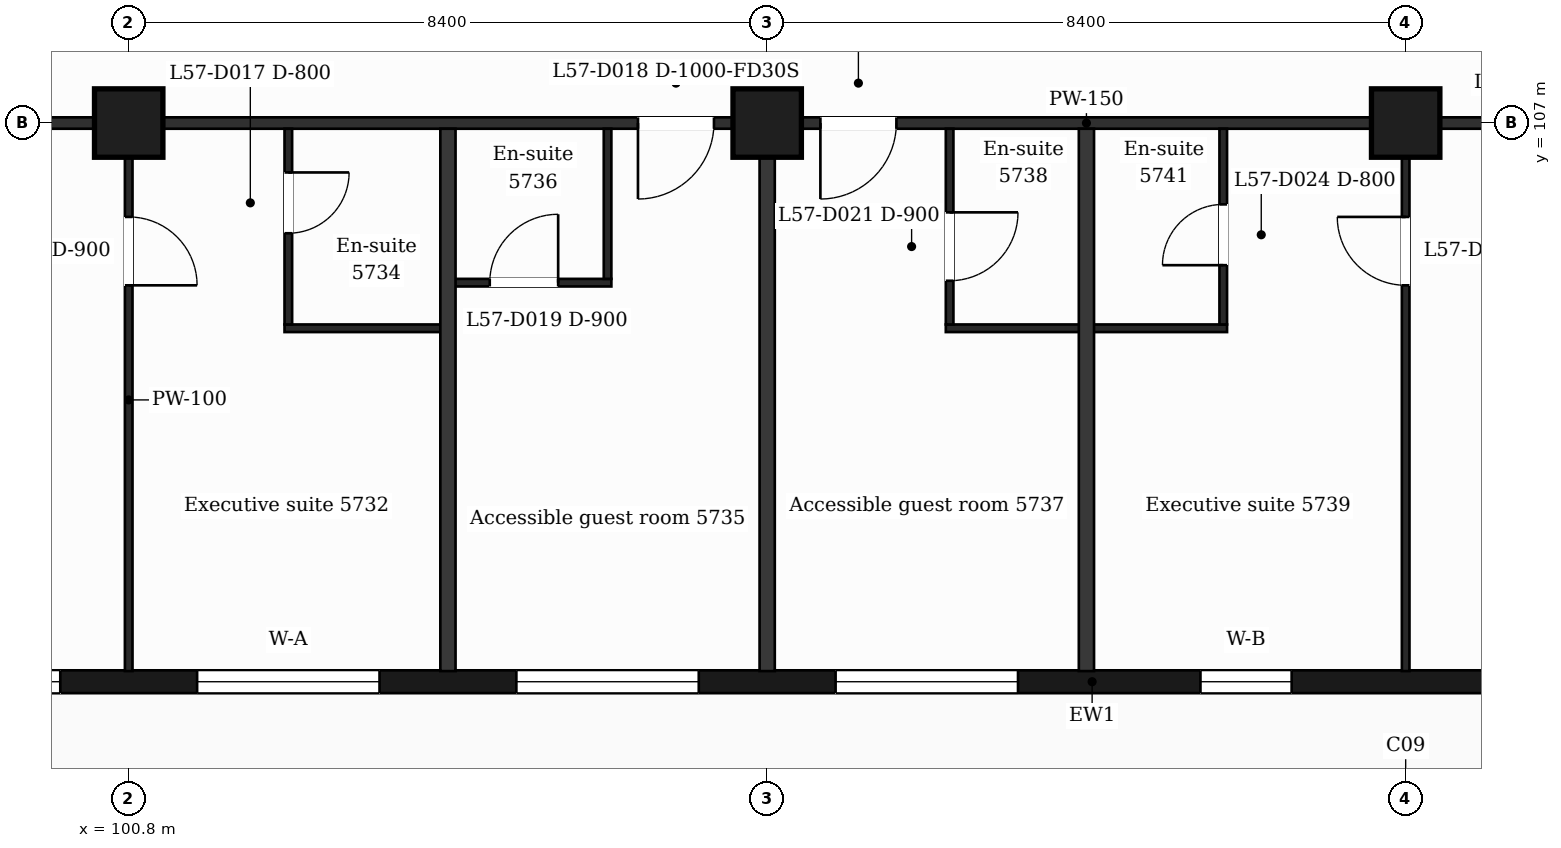
"""IFC4 building model, lengths in metres.
Left out: names, types, materials, properties, quantities, classifications, styles, units other than length and angle.
Written with IfcOpenShell. Run it as: python <this file> out.ifc"""

import sys

from ifc_helpers import new_model, si_unit, direction, frame, frame_2d, origin, origin_2d, place, context, subcontext, project, spatial, rectangle, extrude, element, fill, save


model = new_model("IFC4")
c1 = context("Model", 3, precision=1e-05, world=origin(), true_north=direction((0.0, 1.0)))
c2 = subcontext(c1, "Body", "Model", "MODEL_VIEW")
j1 = project(units=[si_unit("LENGTHUNIT", "METRE"), si_unit("PLANEANGLEUNIT", "RADIAN")], contexts=[c1])
p1 = place(None, origin())
s1 = spatial("IfcSite", under=j1, at=p1, CompositionType="ELEMENT")
p2 = place(p1, origin())
s2 = spatial("IfcBuilding", under=s1, at=p2, CompositionType="ELEMENT")
p3 = place(p2, frame((0.0, 0.0, 235.5)))
s3 = spatial("IfcBuildingStorey", under=s2, at=p3, CompositionType="ELEMENT", Elevation=235.5)
for number, where, z_axis, x_axis in (
    (1, (100.8, 107.0, 0.0), (0.0, 0.0, 1.0), (1.0, 0.0, 0.0)),
    (2, (109.2, 107.0, 0.0), (0.0, 0.0, 1.0), (1.0, 0.0, 0.0)),
    (3, (117.6, 107.0, 0.0), (0.0, 0.0, 1.0), (1.0, 0.0, 0.0)),
):
    element("IfcColumn", number, at=place(p3, frame(where, z_axis=z_axis, x_axis=x_axis)), inside=s3, PredefinedType="COLUMN", context=c2, shape_type="SweptSolid", body=[
        extrude(rectangle(XDim=0.9, YDim=0.9, at=origin_2d()), origin(), (0.0, 0.0, 1.0), 3.7),
    ])
p4 = place(p3, frame((89.85, 99.65, 0.0), z_axis=(0.0, 0.0, 1.0), x_axis=(1.0, 0.0, 0.0)))
e4 = element("IfcWall", 4, at=p4, inside=s3, PredefinedType="SOLIDWALL", context=c2, shape_type="SweptSolid", body=[
    extrude(rectangle(XDim=47.25, YDim=0.3, at=frame_2d((23.625, 0.0))), origin(), (0.0, 0.0, 1.0), 3.38),
])
p5 = place(p4, frame((0.725, 0.0, 0.9)))
e5 = element("IfcOpeningElement", 5, at=p5, cuts=e4, PredefinedType="OPENING", context=c2, shape_type="SweptSolid", body=[
    extrude(rectangle(XDim=1.2, YDim=2.1, at=frame_2d((0.6, 1.05))), frame((0.0, 0.16, 0.0), z_axis=(0.0, -1.0, 0.0), x_axis=(1.0, 0.0, 0.0)), (0.0, 0.0, 1.0), 0.32),
])
p6 = place(p4, frame((3.45, 0.0, 0.9)))
e6 = element("IfcOpeningElement", 6, at=p6, cuts=e4, PredefinedType="OPENING", context=c2, shape_type="SweptSolid", body=[
    extrude(rectangle(XDim=2.4, YDim=2.1, at=frame_2d((1.2, 1.05))), frame((0.0, 0.16, 0.0), z_axis=(0.0, -1.0, 0.0), x_axis=(1.0, 0.0, 0.0)), (0.0, 0.0, 1.0), 0.32),
])
p7 = place(p4, frame((7.65, 0.0, 0.9)))
e7 = element("IfcOpeningElement", 7, at=p7, cuts=e4, PredefinedType="OPENING", context=c2, shape_type="SweptSolid", body=[
    extrude(rectangle(XDim=2.4, YDim=2.1, at=frame_2d((1.2, 1.05))), frame((0.0, 0.16, 0.0), z_axis=(0.0, -1.0, 0.0), x_axis=(1.0, 0.0, 0.0)), (0.0, 0.0, 1.0), 0.32),
])
p8 = place(p4, frame((11.85, 0.0, 0.9)))
e8 = element("IfcOpeningElement", 8, at=p8, cuts=e4, PredefinedType="OPENING", context=c2, shape_type="SweptSolid", body=[
    extrude(rectangle(XDim=2.4, YDim=2.1, at=frame_2d((1.2, 1.05))), frame((0.0, 0.16, 0.0), z_axis=(0.0, -1.0, 0.0), x_axis=(1.0, 0.0, 0.0)), (0.0, 0.0, 1.0), 0.32),
])
p9 = place(p4, frame((16.05, 0.0, 0.9)))
e9 = element("IfcOpeningElement", 9, at=p9, cuts=e4, PredefinedType="OPENING", context=c2, shape_type="SweptSolid", body=[
    extrude(rectangle(XDim=2.4, YDim=2.1, at=frame_2d((1.2, 1.05))), frame((0.0, 0.16, 0.0), z_axis=(0.0, -1.0, 0.0), x_axis=(1.0, 0.0, 0.0)), (0.0, 0.0, 1.0), 0.32),
])
p10 = place(p4, frame((20.25, 0.0, 0.9)))
e10 = element("IfcOpeningElement", 10, at=p10, cuts=e4, PredefinedType="OPENING", context=c2, shape_type="SweptSolid", body=[
    extrude(rectangle(XDim=2.4, YDim=2.1, at=frame_2d((1.2, 1.05))), frame((0.0, 0.16, 0.0), z_axis=(0.0, -1.0, 0.0), x_axis=(1.0, 0.0, 0.0)), (0.0, 0.0, 1.0), 0.32),
])
p11 = place(p4, frame((25.05, 0.0, 0.9)))
e11 = element("IfcOpeningElement", 11, at=p11, cuts=e4, PredefinedType="OPENING", context=c2, shape_type="SweptSolid", body=[
    extrude(rectangle(XDim=1.2, YDim=2.1, at=frame_2d((0.6, 1.05))), frame((0.0, 0.16, 0.0), z_axis=(0.0, -1.0, 0.0), x_axis=(1.0, 0.0, 0.0)), (0.0, 0.0, 1.0), 0.32),
])
p12 = place(p4, frame((29.25, 0.0, 0.9)))
e12 = element("IfcOpeningElement", 12, at=p12, cuts=e4, PredefinedType="OPENING", context=c2, shape_type="SweptSolid", body=[
    extrude(rectangle(XDim=1.2, YDim=2.1, at=frame_2d((0.6, 1.05))), frame((0.0, 0.16, 0.0), z_axis=(0.0, -1.0, 0.0), x_axis=(1.0, 0.0, 0.0)), (0.0, 0.0, 1.0), 0.32),
])
p13 = place(p4, frame((32.55, 0.0, 0.0)))
e13 = element("IfcOpeningElement", 13, at=p13, cuts=e4, PredefinedType="OPENING", context=c2, shape_type="SweptSolid", body=[
    extrude(rectangle(XDim=1.2, YDim=2.4, at=frame_2d((0.6, 1.2))), frame((0.0, 0.16, 0.0), z_axis=(0.0, -1.0, 0.0), x_axis=(1.0, 0.0, 0.0)), (0.0, 0.0, 1.0), 0.32),
])
p14 = place(p4, frame((34.35, 0.0, 0.9)))
e14 = element("IfcOpeningElement", 14, at=p14, cuts=e4, PredefinedType="OPENING", context=c2, shape_type="SweptSolid", body=[
    extrude(rectangle(XDim=1.2, YDim=2.1, at=frame_2d((0.6, 1.05))), frame((0.0, 0.16, 0.0), z_axis=(0.0, -1.0, 0.0), x_axis=(1.0, 0.0, 0.0)), (0.0, 0.0, 1.0), 0.32),
])
p15 = place(p4, frame((37.05, 0.0, 0.9)))
e15 = element("IfcOpeningElement", 15, at=p15, cuts=e4, PredefinedType="OPENING", context=c2, shape_type="SweptSolid", body=[
    extrude(rectangle(XDim=2.4, YDim=2.1, at=frame_2d((1.2, 1.05))), frame((0.0, 0.16, 0.0), z_axis=(0.0, -1.0, 0.0), x_axis=(1.0, 0.0, 0.0)), (0.0, 0.0, 1.0), 0.32),
])
p16 = place(p4, frame((40.95, 0.0, 0.0)))
e16 = element("IfcOpeningElement", 16, at=p16, cuts=e4, PredefinedType="OPENING", context=c2, shape_type="SweptSolid", body=[
    extrude(rectangle(XDim=1.2, YDim=2.4, at=frame_2d((0.6, 1.2))), frame((0.0, 0.16, 0.0), z_axis=(0.0, -1.0, 0.0), x_axis=(1.0, 0.0, 0.0)), (0.0, 0.0, 1.0), 0.32),
])
p17 = place(p4, frame((42.75, 0.0, 0.9)))
e17 = element("IfcOpeningElement", 17, at=p17, cuts=e4, PredefinedType="OPENING", context=c2, shape_type="SweptSolid", body=[
    extrude(rectangle(XDim=1.2, YDim=2.1, at=frame_2d((0.6, 1.05))), frame((0.0, 0.16, 0.0), z_axis=(0.0, -1.0, 0.0), x_axis=(1.0, 0.0, 0.0)), (0.0, 0.0, 1.0), 0.32),
])
p18 = place(p4, frame((45.25, 0.0, 0.9)))
e18 = element("IfcOpeningElement", 18, at=p18, cuts=e4, PredefinedType="OPENING", context=c2, shape_type="SweptSolid", body=[
    extrude(rectangle(XDim=1.2, YDim=2.1, at=frame_2d((0.6, 1.05))), frame((0.0, 0.16, 0.0), z_axis=(0.0, -1.0, 0.0), x_axis=(1.0, 0.0, 0.0)), (0.0, 0.0, 1.0), 0.32),
])
p19 = place(p3, frame((102.85, 104.3, 0.0), z_axis=(0.0, 0.0, 1.0), x_axis=(1.0, 0.0, 0.0)))
e19 = element("IfcWall", 19, at=p19, inside=s3, PredefinedType="PARTITIONING", context=c2, shape_type="SweptSolid", body=[
    extrude(rectangle(XDim=2.15, YDim=0.1, at=frame_2d((1.075, 0.0))), origin(), (0.0, 0.0, 1.0), 3.38),
])
p20 = place(p3, frame((111.55, 104.3, 0.0), z_axis=(0.0, 0.0, 1.0), x_axis=(1.0, 0.0, 0.0)))
e20 = element("IfcWall", 20, at=p20, inside=s3, PredefinedType="PARTITIONING", context=c2, shape_type="SweptSolid", body=[
    extrude(rectangle(XDim=3.7, YDim=0.1, at=frame_2d((1.85, 0.0))), origin(), (0.0, 0.0, 1.0), 3.38),
])
p21 = place(p3, frame((105.0, 104.9, 0.0), z_axis=(0.0, 0.0, 1.0), x_axis=(1.0, 0.0, 0.0)))
e21 = element("IfcWall", 21, at=p21, inside=s3, PredefinedType="PARTITIONING", context=c2, shape_type="SweptSolid", body=[
    extrude(rectangle(XDim=2.15, YDim=0.1, at=frame_2d((1.075, 0.0))), origin(), (0.0, 0.0, 1.0), 3.38),
])
p22 = place(p21, frame((0.55, 0.0, 0.0)))
e22 = element("IfcOpeningElement", 22, at=p22, cuts=e21, PredefinedType="OPENING", context=c2, shape_type="SweptSolid", body=[
    extrude(rectangle(XDim=0.9, YDim=2.1, at=frame_2d((0.45, 1.05))), frame((0.0, 0.06, 0.0), z_axis=(0.0, -1.0, 0.0), x_axis=(1.0, 0.0, 0.0)), (0.0, 0.0, 1.0), 0.12),
])
p23 = place(p3, frame((87.018, 107.0, 0.0), z_axis=(0.0, 0.0, 1.0), x_axis=(1.0, 0.0, 0.0)))
e23 = element("IfcWall", 23, at=p23, inside=s3, PredefinedType="PARTITIONING", context=c2, shape_type="SweptSolid", body=[
    extrude(rectangle(XDim=52.765, YDim=0.15, at=frame_2d((26.382, 0.0))), origin(), (0.0, 0.0, 1.0), 3.38),
])
p24 = place(p23, frame((0.707, 0.0, 0.0)))
e24 = element("IfcOpeningElement", 24, at=p24, cuts=e23, PredefinedType="OPENING", context=c2, shape_type="SweptSolid", body=[
    extrude(rectangle(XDim=0.95, YDim=2.1, at=frame_2d((0.475, 1.05))), frame((0.0, 0.085, 0.0), z_axis=(0.0, -1.0, 0.0), x_axis=(1.0, 0.0, 0.0)), (0.0, 0.0, 1.0), 0.17),
])
p25 = place(p23, frame((8.412, 0.0, 0.0)))
e25 = element("IfcOpeningElement", 25, at=p25, cuts=e23, PredefinedType="OPENING", context=c2, shape_type="SweptSolid", body=[
    extrude(rectangle(XDim=1.0, YDim=2.1, at=frame_2d((0.5, 1.05))), frame((0.0, 0.085, 0.0), z_axis=(0.0, -1.0, 0.0), x_axis=(1.0, 0.0, 0.0)), (0.0, 0.0, 1.0), 0.17),
])
p26 = place(p23, frame((20.482, 0.0, 0.0)))
e26 = element("IfcOpeningElement", 26, at=p26, cuts=e23, PredefinedType="OPENING", context=c2, shape_type="SweptSolid", body=[
    extrude(rectangle(XDim=1.0, YDim=2.1, at=frame_2d((0.5, 1.05))), frame((0.0, 0.085, 0.0), z_axis=(0.0, -1.0, 0.0), x_axis=(1.0, 0.0, 0.0)), (0.0, 0.0, 1.0), 0.17),
])
p27 = place(p23, frame((22.882, 0.0, 0.0)))
e27 = element("IfcOpeningElement", 27, at=p27, cuts=e23, PredefinedType="OPENING", context=c2, shape_type="SweptSolid", body=[
    extrude(rectangle(XDim=1.0, YDim=2.1, at=frame_2d((0.5, 1.05))), frame((0.0, 0.085, 0.0), z_axis=(0.0, -1.0, 0.0), x_axis=(1.0, 0.0, 0.0)), (0.0, 0.0, 1.0), 0.17),
])
p28 = place(p23, frame((32.607, 0.0, 0.0)))
e28 = element("IfcOpeningElement", 28, at=p28, cuts=e23, PredefinedType="OPENING", context=c2, shape_type="SweptSolid", body=[
    extrude(rectangle(XDim=1.0, YDim=2.1, at=frame_2d((0.5, 1.05))), frame((0.0, 0.085, 0.0), z_axis=(0.0, -1.0, 0.0), x_axis=(1.0, 0.0, 0.0)), (0.0, 0.0, 1.0), 0.17),
])
p29 = place(p23, frame((39.707, 0.0, 0.0)))
e29 = element("IfcOpeningElement", 29, at=p29, cuts=e23, PredefinedType="OPENING", context=c2, shape_type="SweptSolid", body=[
    extrude(rectangle(XDim=0.95, YDim=2.1, at=frame_2d((0.475, 1.05))), frame((0.0, 0.085, 0.0), z_axis=(0.0, -1.0, 0.0), x_axis=(1.0, 0.0, 0.0)), (0.0, 0.0, 1.0), 0.17),
])
p30 = place(p23, frame((43.457, 0.0, 0.0)))
e30 = element("IfcOpeningElement", 30, at=p30, cuts=e23, PredefinedType="OPENING", context=c2, shape_type="SweptSolid", body=[
    extrude(rectangle(XDim=0.95, YDim=2.1, at=frame_2d((0.475, 1.05))), frame((0.0, 0.085, 0.0), z_axis=(0.0, -1.0, 0.0), x_axis=(1.0, 0.0, 0.0)), (0.0, 0.0, 1.0), 0.17),
])
p31 = place(p23, frame((49.285, 0.0, 0.0)))
e31 = element("IfcOpeningElement", 31, at=p31, cuts=e23, PredefinedType="OPENING", context=c2, shape_type="SweptSolid", body=[
    extrude(rectangle(XDim=0.95, YDim=2.1, at=frame_2d((0.475, 1.05))), frame((0.0, 0.085, 0.0), z_axis=(0.0, -1.0, 0.0), x_axis=(1.0, 0.0, 0.0)), (0.0, 0.0, 1.0), 0.17),
])
p32 = place(p3, frame((100.8, 99.79, 0.0), z_axis=(0.0, 0.0, 1.0), x_axis=(0.0, 1.0, 0.0)))
e32 = element("IfcWall", 32, at=p32, inside=s3, PredefinedType="PARTITIONING", context=c2, shape_type="SweptSolid", body=[
    extrude(rectangle(XDim=7.135, YDim=0.1, at=frame_2d((3.567, 0.0))), origin(), (0.0, 0.0, 1.0), 3.38),
])
p33 = place(p32, frame((5.075, 0.0, 0.0)))
e33 = element("IfcOpeningElement", 33, at=p33, cuts=e32, PredefinedType="OPENING", context=c2, shape_type="SweptSolid", body=[
    extrude(rectangle(XDim=0.9, YDim=2.1, at=frame_2d((0.45, 1.05))), frame((0.0, 0.06, 0.0), z_axis=(0.0, -1.0, 0.0), x_axis=(1.0, 0.0, 0.0)), (0.0, 0.0, 1.0), 0.12),
])
p34 = place(p3, frame((102.9, 104.35, 0.0), z_axis=(0.0, 0.0, 1.0), x_axis=(0.0, 1.0, 0.0)))
e34 = element("IfcWall", 34, at=p34, inside=s3, PredefinedType="PARTITIONING", context=c2, shape_type="SweptSolid", body=[
    extrude(rectangle(XDim=2.575, YDim=0.1, at=frame_2d((1.288, 0.0))), origin(), (0.0, 0.0, 1.0), 3.38),
])
p35 = place(p34, frame((1.2, 0.0, 0.0)))
e35 = element("IfcOpeningElement", 35, at=p35, cuts=e34, PredefinedType="OPENING", context=c2, shape_type="SweptSolid", body=[
    extrude(rectangle(XDim=0.8, YDim=2.1, at=frame_2d((0.4, 1.05))), frame((0.0, 0.06, 0.0), z_axis=(0.0, -1.0, 0.0), x_axis=(1.0, 0.0, 0.0)), (0.0, 0.0, 1.0), 0.12),
])
p36 = place(p3, frame((105.0, 99.79, 0.0), z_axis=(0.0, 0.0, 1.0), x_axis=(0.0, 1.0, 0.0)))
e36 = element("IfcWall", 36, at=p36, inside=s3, PredefinedType="PARTITIONING", context=c2, shape_type="SweptSolid", body=[
    extrude(rectangle(XDim=7.135, YDim=0.2, at=frame_2d((3.567, 0.0))), origin(), (0.0, 0.0, 1.0), 3.38),
])
p37 = place(p3, frame((107.1, 104.95, 0.0), z_axis=(0.0, 0.0, 1.0), x_axis=(0.0, 1.0, 0.0)))
e37 = element("IfcWall", 37, at=p37, inside=s3, PredefinedType="PARTITIONING", context=c2, shape_type="SweptSolid", body=[
    extrude(rectangle(XDim=1.975, YDim=0.1, at=frame_2d((0.988, 0.0))), origin(), (0.0, 0.0, 1.0), 3.38),
])
p38 = place(p3, frame((109.2, 99.79, 0.0), z_axis=(0.0, 0.0, 1.0), x_axis=(0.0, 1.0, 0.0)))
e38 = element("IfcWall", 38, at=p38, inside=s3, PredefinedType="PARTITIONING", context=c2, shape_type="SweptSolid", body=[
    extrude(rectangle(XDim=7.135, YDim=0.2, at=frame_2d((3.567, 0.0))), origin(), (0.0, 0.0, 1.0), 3.38),
])
p39 = place(p3, frame((111.6, 104.35, 0.0), z_axis=(0.0, 0.0, 1.0), x_axis=(0.0, 1.0, 0.0)))
e39 = element("IfcWall", 39, at=p39, inside=s3, PredefinedType="PARTITIONING", context=c2, shape_type="SweptSolid", body=[
    extrude(rectangle(XDim=2.575, YDim=0.1, at=frame_2d((1.288, 0.0))), origin(), (0.0, 0.0, 1.0), 3.38),
])
p40 = place(p39, frame((0.575, 0.0, 0.0)))
e40 = element("IfcOpeningElement", 40, at=p40, cuts=e39, PredefinedType="OPENING", context=c2, shape_type="SweptSolid", body=[
    extrude(rectangle(XDim=0.9, YDim=2.1, at=frame_2d((0.45, 1.05))), frame((0.0, 0.06, 0.0), z_axis=(0.0, -1.0, 0.0), x_axis=(1.0, 0.0, 0.0)), (0.0, 0.0, 1.0), 0.12),
])
p41 = place(p3, frame((113.4, 99.79, 0.0), z_axis=(0.0, 0.0, 1.0), x_axis=(0.0, 1.0, 0.0)))
e41 = element("IfcWall", 41, at=p41, inside=s3, PredefinedType="PARTITIONING", context=c2, shape_type="SweptSolid", body=[
    extrude(rectangle(XDim=7.135, YDim=0.2, at=frame_2d((3.567, 0.0))), origin(), (0.0, 0.0, 1.0), 3.38),
])
p42 = place(p3, frame((115.2, 104.35, 0.0), z_axis=(0.0, 0.0, 1.0), x_axis=(0.0, 1.0, 0.0)))
e42 = element("IfcWall", 42, at=p42, inside=s3, PredefinedType="PARTITIONING", context=c2, shape_type="SweptSolid", body=[
    extrude(rectangle(XDim=2.575, YDim=0.1, at=frame_2d((1.288, 0.0))), origin(), (0.0, 0.0, 1.0), 3.38),
])
p43 = place(p42, frame((0.78, 0.0, 0.0)))
e43 = element("IfcOpeningElement", 43, at=p43, cuts=e42, PredefinedType="OPENING", context=c2, shape_type="SweptSolid", body=[
    extrude(rectangle(XDim=0.8, YDim=2.1, at=frame_2d((0.4, 1.05))), frame((0.0, 0.06, 0.0), z_axis=(0.0, -1.0, 0.0), x_axis=(1.0, 0.0, 0.0)), (0.0, 0.0, 1.0), 0.12),
])
p44 = place(p3, frame((117.6, 99.79, 0.0), z_axis=(0.0, 0.0, 1.0), x_axis=(0.0, 1.0, 0.0)))
e44 = element("IfcWall", 44, at=p44, inside=s3, PredefinedType="PARTITIONING", context=c2, shape_type="SweptSolid", body=[
    extrude(rectangle(XDim=7.135, YDim=0.1, at=frame_2d((3.567, 0.0))), origin(), (0.0, 0.0, 1.0), 3.38),
])
p45 = place(p44, frame((5.075, 0.0, 0.0)))
e45 = element("IfcOpeningElement", 45, at=p45, cuts=e44, PredefinedType="OPENING", context=c2, shape_type="SweptSolid", body=[
    extrude(rectangle(XDim=0.9, YDim=2.1, at=frame_2d((0.45, 1.05))), frame((0.0, 0.06, 0.0), z_axis=(0.0, -1.0, 0.0), x_axis=(1.0, 0.0, 0.0)), (0.0, 0.0, 1.0), 0.12),
])
p46 = place(p7, origin())
e46 = element("IfcWindow", 46, at=p46, inside=s3, PartitioningType="SINGLE_PANEL", PredefinedType="WINDOW", context=c2, shape_type="SweptSolid", body=[
    extrude(rectangle(XDim=2.4, YDim=2.1, at=frame_2d((1.2, 1.05))), frame((0.0, 0.03, 0.0), z_axis=(0.0, -1.0, 0.0), x_axis=(1.0, 0.0, 0.0)), (0.0, 0.0, 1.0), 0.06),
])
fill(e7, e46)
p47 = place(p8, origin())
e47 = element("IfcWindow", 47, at=p47, inside=s3, PartitioningType="SINGLE_PANEL", PredefinedType="WINDOW", context=c2, shape_type="SweptSolid", body=[
    extrude(rectangle(XDim=2.4, YDim=2.1, at=frame_2d((1.2, 1.05))), frame((0.0, 0.03, 0.0), z_axis=(0.0, -1.0, 0.0), x_axis=(1.0, 0.0, 0.0)), (0.0, 0.0, 1.0), 0.06),
])
fill(e8, e47)
p48 = place(p9, origin())
e48 = element("IfcWindow", 48, at=p48, inside=s3, PartitioningType="SINGLE_PANEL", PredefinedType="WINDOW", context=c2, shape_type="SweptSolid", body=[
    extrude(rectangle(XDim=2.4, YDim=2.1, at=frame_2d((1.2, 1.05))), frame((0.0, 0.03, 0.0), z_axis=(0.0, -1.0, 0.0), x_axis=(1.0, 0.0, 0.0)), (0.0, 0.0, 1.0), 0.06),
])
fill(e9, e48)
p49 = place(p10, origin())
e49 = element("IfcWindow", 49, at=p49, inside=s3, PartitioningType="SINGLE_PANEL", PredefinedType="WINDOW", context=c2, shape_type="SweptSolid", body=[
    extrude(rectangle(XDim=2.4, YDim=2.1, at=frame_2d((1.2, 1.05))), frame((0.0, 0.03, 0.0), z_axis=(0.0, -1.0, 0.0), x_axis=(1.0, 0.0, 0.0)), (0.0, 0.0, 1.0), 0.06),
])
fill(e10, e49)
p50 = place(p11, origin())
e50 = element("IfcWindow", 50, at=p50, inside=s3, PartitioningType="SINGLE_PANEL", PredefinedType="WINDOW", context=c2, shape_type="SweptSolid", body=[
    extrude(rectangle(XDim=1.2, YDim=2.1, at=frame_2d((0.6, 1.05))), frame((0.0, 0.03, 0.0), z_axis=(0.0, -1.0, 0.0), x_axis=(1.0, 0.0, 0.0)), (0.0, 0.0, 1.0), 0.06),
])
fill(e11, e50)
p51 = place(p33, origin())
e51 = element("IfcDoor", 51, at=p51, inside=s3, OperationType="SINGLE_SWING_LEFT", PredefinedType="DOOR", context=c2, shape_type="SweptSolid", body=[
    extrude(rectangle(XDim=0.9, YDim=2.1, at=frame_2d((0.45, 1.05))), frame((0.0, 0.025, 0.0), z_axis=(0.0, -1.0, 0.0), x_axis=(1.0, 0.0, 0.0)), (0.0, 0.0, 1.0), 0.05),
])
fill(e33, e51)
p52 = place(p35, origin())
e52 = element("IfcDoor", 52, at=p52, inside=s3, OperationType="SINGLE_SWING_RIGHT", PredefinedType="DOOR", context=c2, shape_type="SweptSolid", body=[
    extrude(rectangle(XDim=0.8, YDim=2.1, at=frame_2d((0.4, 1.05))), frame((0.0, 0.025, 0.0), z_axis=(0.0, -1.0, 0.0), x_axis=(1.0, 0.0, 0.0)), (0.0, 0.0, 1.0), 0.05),
])
fill(e35, e52)
p53 = place(p26, origin())
e53 = element("IfcDoor", 53, at=p53, inside=s3, OperationType="SINGLE_SWING_LEFT", PredefinedType="DOOR", context=c2, shape_type="SweptSolid", body=[
    extrude(rectangle(XDim=1.0, YDim=2.1, at=frame_2d((0.5, 1.05))), frame((0.0, 0.025, 0.0), z_axis=(0.0, -1.0, 0.0), x_axis=(1.0, 0.0, 0.0)), (0.0, 0.0, 1.0), 0.05),
])
fill(e26, e53)
p54 = place(p22, origin())
e54 = element("IfcDoor", 54, at=p54, inside=s3, OperationType="SINGLE_SWING_RIGHT", PredefinedType="DOOR", context=c2, shape_type="SweptSolid", body=[
    extrude(rectangle(XDim=0.9, YDim=2.1, at=frame_2d((0.45, 1.05))), frame((0.0, 0.025, 0.0), z_axis=(0.0, -1.0, 0.0), x_axis=(1.0, 0.0, 0.0)), (0.0, 0.0, 1.0), 0.05),
])
fill(e22, e54)
p55 = place(p27, origin())
e55 = element("IfcDoor", 55, at=p55, inside=s3, OperationType="SINGLE_SWING_LEFT", PredefinedType="DOOR", context=c2, shape_type="SweptSolid", body=[
    extrude(rectangle(XDim=1.0, YDim=2.1, at=frame_2d((0.5, 1.05))), frame((0.0, 0.025, 0.0), z_axis=(0.0, -1.0, 0.0), x_axis=(1.0, 0.0, 0.0)), (0.0, 0.0, 1.0), 0.05),
])
fill(e27, e55)
p56 = place(p40, origin())
e56 = element("IfcDoor", 56, at=p56, inside=s3, OperationType="SINGLE_SWING_RIGHT", PredefinedType="DOOR", context=c2, shape_type="SweptSolid", body=[
    extrude(rectangle(XDim=0.9, YDim=2.1, at=frame_2d((0.45, 1.05))), frame((0.0, 0.025, 0.0), z_axis=(0.0, -1.0, 0.0), x_axis=(1.0, 0.0, 0.0)), (0.0, 0.0, 1.0), 0.05),
])
fill(e40, e56)
p57 = place(p45, origin())
e57 = element("IfcDoor", 57, at=p57, inside=s3, OperationType="SINGLE_SWING_RIGHT", PredefinedType="DOOR", context=c2, shape_type="SweptSolid", body=[
    extrude(rectangle(XDim=0.9, YDim=2.1, at=frame_2d((0.45, 1.05))), frame((0.0, 0.025, 0.0), z_axis=(0.0, -1.0, 0.0), x_axis=(1.0, 0.0, 0.0)), (0.0, 0.0, 1.0), 0.05),
])
fill(e45, e57)
p58 = place(p43, origin())
e58 = element("IfcDoor", 58, at=p58, inside=s3, OperationType="SINGLE_SWING_LEFT", PredefinedType="DOOR", context=c2, shape_type="SweptSolid", body=[
    extrude(rectangle(XDim=0.8, YDim=2.1, at=frame_2d((0.4, 1.05))), frame((0.0, 0.025, 0.0), z_axis=(0.0, -1.0, 0.0), x_axis=(1.0, 0.0, 0.0)), (0.0, 0.0, 1.0), 0.05),
])
fill(e43, e58)
save(model, sys.argv[1])
